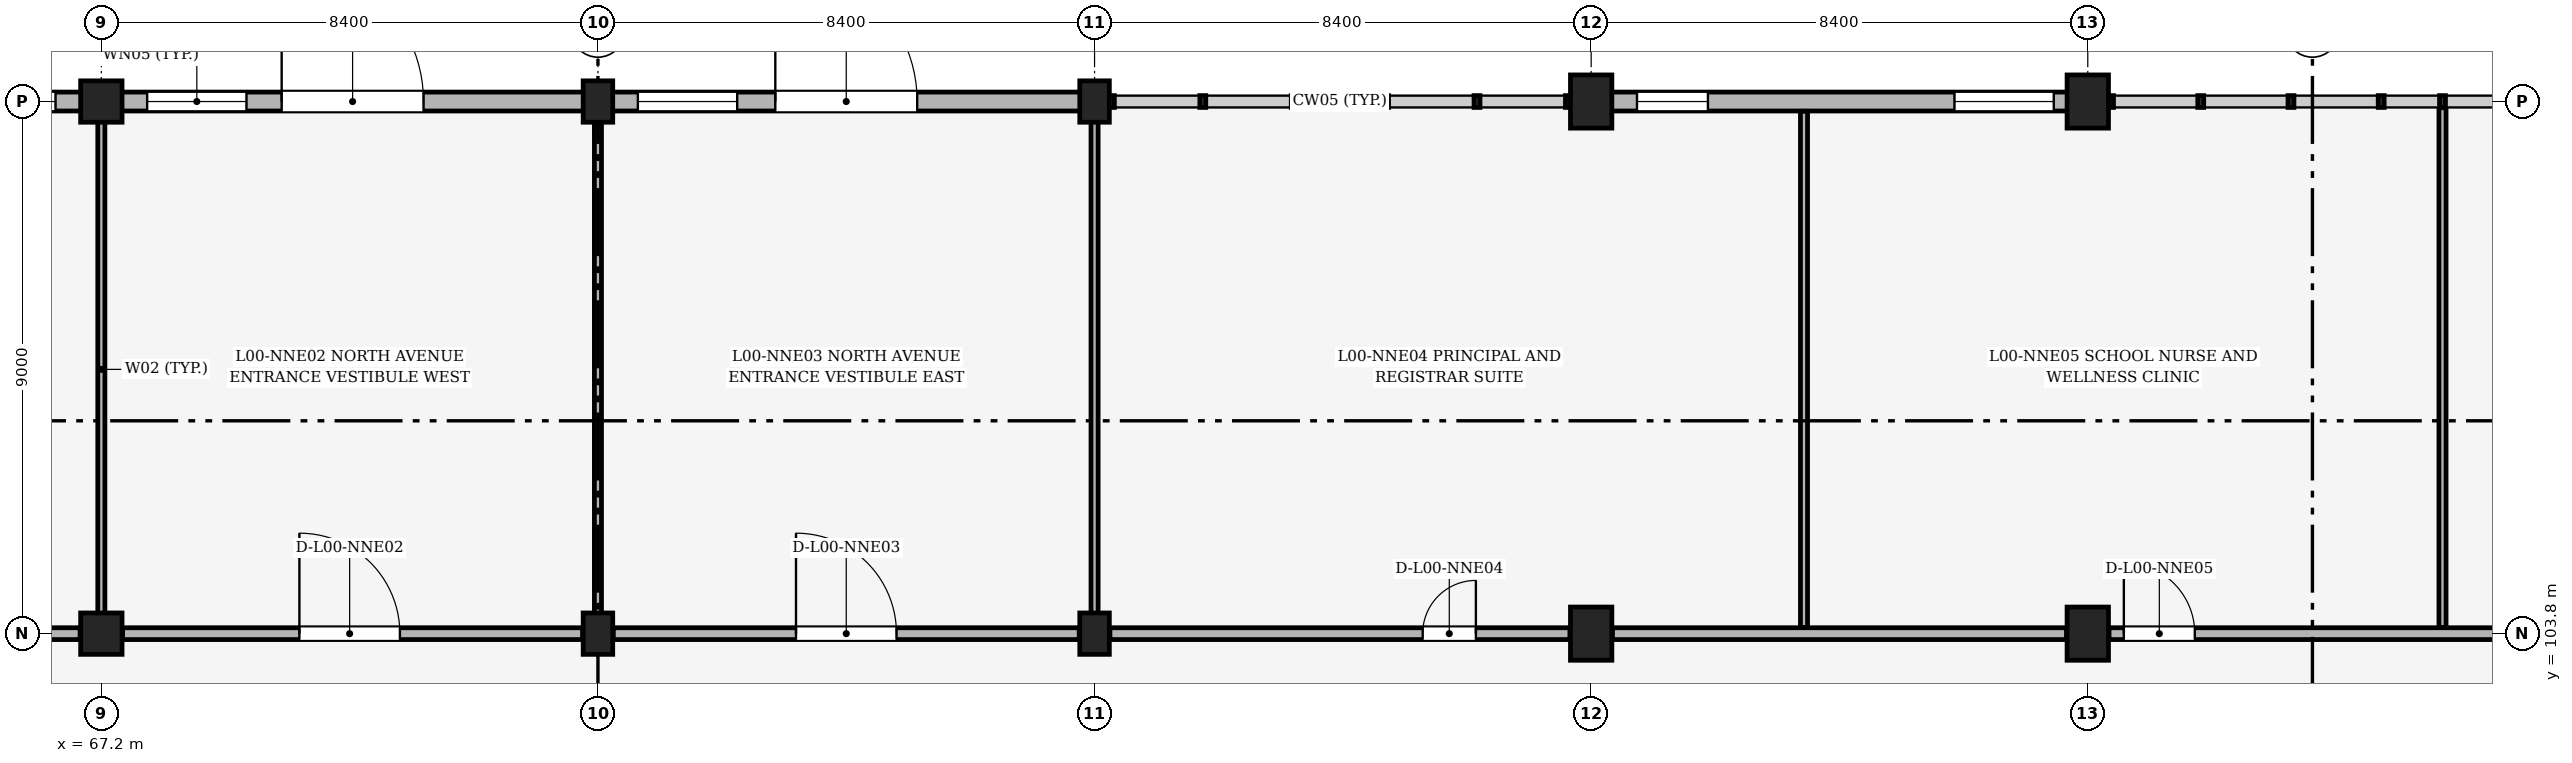
"""IFC4 building model, lengths in metres.
Left out: names, types, materials, properties, quantities, classifications, styles, units other than length and angle.
Written with IfcOpenShell. Run it as: python <this file> out.ifc"""

import sys

from ifc_helpers import new_model, si_unit, direction, frame, frame_2d, origin, origin_2d, place, context, subcontext, project, spatial, rectangle, extrude, element, fill, save


model = new_model("IFC4")
c1 = context("Model", 3, precision=1e-05, world=origin(), true_north=direction((0.0, 1.0)))
c2 = subcontext(c1, "Body", "Model", "MODEL_VIEW")
j1 = project(units=[si_unit("LENGTHUNIT", "METRE"), si_unit("PLANEANGLEUNIT", "RADIAN")], contexts=[c1])
p1 = place(None, origin())
s1 = spatial("IfcSite", under=j1, at=p1, CompositionType="ELEMENT")
p2 = place(p1, origin())
s2 = spatial("IfcBuilding", under=s1, at=p2, CompositionType="ELEMENT")
p3 = place(p2, origin())
s3 = spatial("IfcBuildingStorey", under=s2, at=p3, CompositionType="ELEMENT", Elevation=0.0)
for number, where, z_axis, x_axis in (
    (1, (67.2, 103.8, 0.0), (0.0, 0.0, 1.0), (1.0, 0.0, 0.0)),
    (2, (67.2, 112.8, 0.0), (0.0, 0.0, 1.0), (1.0, 0.0, 0.0)),
):
    element("IfcColumn", number, at=place(p3, frame(where, z_axis=z_axis, x_axis=x_axis)), inside=s3, PredefinedType="COLUMN", context=c2, shape_type="SweptSolid", body=[
        extrude(rectangle(XDim=0.7, YDim=0.7, at=origin_2d()), origin(), (0.0, 0.0, 1.0), 4.8),
    ])
for number, where, z_axis, x_axis in (
    (3, (75.6, 103.8, 0.0), (0.0, 0.0, 1.0), (1.0, 0.0, 0.0)),
    (4, (75.6, 112.8, 0.0), (0.0, 0.0, 1.0), (1.0, 0.0, 0.0)),
    (5, (84.0, 103.8, 0.0), (0.0, 0.0, 1.0), (1.0, 0.0, 0.0)),
    (6, (84.0, 112.8, 0.0), (0.0, 0.0, 1.0), (1.0, 0.0, 0.0)),
):
    element("IfcColumn", number, at=place(p3, frame(where, z_axis=z_axis, x_axis=x_axis)), inside=s3, PredefinedType="COLUMN", context=c2, shape_type="SweptSolid", body=[
        extrude(rectangle(XDim=0.5, YDim=0.7, at=origin_2d()), origin(), (0.0, 0.0, 1.0), 4.8),
    ])
for number, where, z_axis, x_axis in (
    (7, (92.4, 103.8, 0.0), (0.0, 0.0, 1.0), (1.0, 0.0, 0.0)),
    (8, (92.4, 112.8, 0.0), (0.0, 0.0, 1.0), (1.0, 0.0, 0.0)),
    (9, (100.8, 103.8, 0.0), (0.0, 0.0, 1.0), (1.0, 0.0, 0.0)),
    (10, (100.8, 112.8, 0.0), (0.0, 0.0, 1.0), (1.0, 0.0, 0.0)),
):
    element("IfcColumn", number, at=place(p3, frame(where, z_axis=z_axis, x_axis=x_axis)), inside=s3, PredefinedType="COLUMN", context=c2, shape_type="SweptSolid", body=[
        extrude(rectangle(XDim=0.7, YDim=0.9, at=origin_2d()), origin(), (0.0, 0.0, 1.0), 4.8),
    ])
p4 = place(p3, frame((59.125, 112.8, 0.0), z_axis=(0.0, 0.0, 1.0), x_axis=(1.0, 0.0, 0.0)))
e11 = element("IfcWall", 11, at=p4, inside=s3, PredefinedType="SOLIDWALL", context=c2, shape_type="SweptSolid", body=[
    extrude(rectangle(XDim=7.75, YDim=0.32, at=frame_2d((3.875, 0.0))), origin(), (0.0, 0.0, 1.0), 3.82),
])
p5 = place(p4, frame((0.45, 0.0, 0.9)))
e12 = element("IfcOpeningElement", 12, at=p5, cuts=e11, PredefinedType="OPENING", context=c2, shape_type="SweptSolid", body=[
    extrude(rectangle(XDim=1.2, YDim=1.5, at=frame_2d((0.6, 0.75))), frame((0.0, 0.17, 0.0), z_axis=(0.0, -1.0, 0.0), x_axis=(1.0, 0.0, 0.0)), (0.0, 0.0, 1.0), 0.34),
])
p6 = place(p4, frame((6.1, 0.0, 0.9)))
e13 = element("IfcOpeningElement", 13, at=p6, cuts=e11, PredefinedType="OPENING", context=c2, shape_type="SweptSolid", body=[
    extrude(rectangle(XDim=1.2, YDim=1.8, at=frame_2d((0.6, 0.9))), frame((0.0, 0.17, 0.0), z_axis=(0.0, -1.0, 0.0), x_axis=(1.0, 0.0, 0.0)), (0.0, 0.0, 1.0), 0.34),
])
p7 = place(p3, frame((67.525, 112.8, 0.0), z_axis=(0.0, 0.0, 1.0), x_axis=(1.0, 0.0, 0.0)))
e14 = element("IfcWall", 14, at=p7, inside=s3, PredefinedType="SOLIDWALL", context=c2, shape_type="SweptSolid", body=[
    extrude(rectangle(XDim=7.85, YDim=0.32, at=frame_2d((3.925, 0.0))), origin(), (0.0, 0.0, 1.0), 3.87),
])
p8 = place(p7, frame((2.725, 0.0, 0.0)))
e15 = element("IfcOpeningElement", 15, at=p8, cuts=e14, PredefinedType="OPENING", context=c2, shape_type="SweptSolid", body=[
    extrude(rectangle(XDim=2.4, YDim=2.6, at=frame_2d((1.2, 1.3))), frame((0.0, 0.17, 0.0), z_axis=(0.0, -1.0, 0.0), x_axis=(1.0, 0.0, 0.0)), (0.0, 0.0, 1.0), 0.34),
])
p9 = place(p7, frame((0.45, 0.0, 0.95)))
e16 = element("IfcOpeningElement", 16, at=p9, cuts=e14, PredefinedType="OPENING", context=c2, shape_type="SweptSolid", body=[
    extrude(rectangle(XDim=1.68, YDim=1.8, at=frame_2d((0.84, 0.9))), frame((0.0, 0.17, 0.0), z_axis=(0.0, -1.0, 0.0), x_axis=(1.0, 0.0, 0.0)), (0.0, 0.0, 1.0), 0.34),
])
p10 = place(p3, frame((75.825, 112.8, 0.0), z_axis=(0.0, 0.0, 1.0), x_axis=(1.0, 0.0, 0.0)))
e17 = element("IfcWall", 17, at=p10, inside=s3, PredefinedType="SOLIDWALL", context=c2, shape_type="SweptSolid", body=[
    extrude(rectangle(XDim=7.95, YDim=0.32, at=frame_2d((3.975, 0.0))), origin(), (0.0, 0.0, 1.0), 3.82),
])
p11 = place(p10, frame((2.775, 0.0, 0.0)))
e18 = element("IfcOpeningElement", 18, at=p11, cuts=e17, PredefinedType="OPENING", context=c2, shape_type="SweptSolid", body=[
    extrude(rectangle(XDim=2.4, YDim=2.6, at=frame_2d((1.2, 1.3))), frame((0.0, 0.17, 0.0), z_axis=(0.0, -1.0, 0.0), x_axis=(1.0, 0.0, 0.0)), (0.0, 0.0, 1.0), 0.34),
])
p12 = place(p10, frame((0.45, 0.0, 0.95)))
e19 = element("IfcOpeningElement", 19, at=p12, cuts=e17, PredefinedType="OPENING", context=c2, shape_type="SweptSolid", body=[
    extrude(rectangle(XDim=1.68, YDim=1.8, at=frame_2d((0.84, 0.9))), frame((0.0, 0.17, 0.0), z_axis=(0.0, -1.0, 0.0), x_axis=(1.0, 0.0, 0.0)), (0.0, 0.0, 1.0), 0.34),
])
p13 = place(p3, frame((92.725, 112.8, 0.0), z_axis=(0.0, 0.0, 1.0), x_axis=(1.0, 0.0, 0.0)))
e20 = element("IfcWall", 20, at=p13, inside=s3, PredefinedType="SOLIDWALL", context=c2, shape_type="SweptSolid", body=[
    extrude(rectangle(XDim=7.75, YDim=0.32, at=frame_2d((3.875, 0.0))), origin(), (0.0, 0.0, 1.0), 3.72),
])
p14 = place(p13, frame((0.45, 0.0, 0.9)))
e21 = element("IfcOpeningElement", 21, at=p14, cuts=e20, PredefinedType="OPENING", context=c2, shape_type="SweptSolid", body=[
    extrude(rectangle(XDim=1.2, YDim=1.8, at=frame_2d((0.6, 0.9))), frame((0.0, 0.17, 0.0), z_axis=(0.0, -1.0, 0.0), x_axis=(1.0, 0.0, 0.0)), (0.0, 0.0, 1.0), 0.34),
])
p15 = place(p13, frame((5.82, 0.0, 0.9)))
e22 = element("IfcOpeningElement", 22, at=p15, cuts=e20, PredefinedType="OPENING", context=c2, shape_type="SweptSolid", body=[
    extrude(rectangle(XDim=1.68, YDim=2.4, at=frame_2d((0.84, 1.2))), frame((0.0, 0.17, 0.0), z_axis=(0.0, -1.0, 0.0), x_axis=(1.0, 0.0, 0.0)), (0.0, 0.0, 1.0), 0.34),
])
p16 = place(p3, frame((67.2, 103.905, 0.0), z_axis=(0.0, 0.0, 1.0), x_axis=(0.0, 1.0, 0.0)))
e23 = element("IfcWall", 23, at=p16, inside=s3, PredefinedType="PARTITIONING", context=c2, shape_type="SweptSolid", body=[
    extrude(rectangle(XDim=8.73, YDim=0.12, at=frame_2d((4.365, 0.0))), origin(), (0.0, 0.0, 1.0), 3.52),
])
p17 = place(p3, frame((75.6, 103.905, 0.0), z_axis=(0.0, 0.0, 1.0), x_axis=(0.0, 1.0, 0.0)))
e24 = element("IfcWall", 24, at=p17, inside=s3, PredefinedType="PARTITIONING", context=c2, shape_type="SweptSolid", body=[
    extrude(rectangle(XDim=8.73, YDim=0.12, at=frame_2d((4.365, 0.0))), origin(), (0.0, 0.0, 1.0), 3.87),
])
p18 = place(p3, frame((84.0, 103.905, 0.0), z_axis=(0.0, 0.0, 1.0), x_axis=(0.0, 1.0, 0.0)))
e25 = element("IfcWall", 25, at=p18, inside=s3, PredefinedType="PARTITIONING", context=c2, shape_type="SweptSolid", body=[
    extrude(rectangle(XDim=8.73, YDim=0.12, at=frame_2d((4.365, 0.0))), origin(), (0.0, 0.0, 1.0), 3.72),
])
p19 = place(p3, frame((96.0, 103.905, 0.0), z_axis=(0.0, 0.0, 1.0), x_axis=(0.0, 1.0, 0.0)))
e26 = element("IfcWall", 26, at=p19, inside=s3, PredefinedType="PARTITIONING", context=c2, shape_type="SweptSolid", body=[
    extrude(rectangle(XDim=8.73, YDim=0.12, at=frame_2d((4.365, 0.0))), origin(), (0.0, 0.0, 1.0), 4.5),
])
p20 = place(p3, frame((106.8, 103.905, 0.0), z_axis=(0.0, 0.0, 1.0), x_axis=(0.0, 1.0, 0.0)))
e27 = element("IfcWall", 27, at=p20, inside=s3, PredefinedType="PARTITIONING", context=c2, shape_type="SweptSolid", body=[
    extrude(rectangle(XDim=8.79, YDim=0.12, at=frame_2d((4.395, 0.0))), origin(), (0.0, 0.0, 1.0), 4.5),
])
p21 = place(p3, frame((59.16, 103.8, 0.0), z_axis=(0.0, 0.0, 1.0), x_axis=(1.0, 0.0, 0.0)))
e28 = element("IfcWall", 28, at=p21, inside=s3, PredefinedType="PARTITIONING", context=c2, shape_type="SweptSolid", body=[
    extrude(rectangle(XDim=7.68, YDim=0.2, at=frame_2d((3.84, 0.0))), origin(), (0.0, 0.0, 1.0), 3.62),
])
p22 = place(p21, frame((1.315, 0.0, 0.0)))
e29 = element("IfcOpeningElement", 29, at=p22, cuts=e28, PredefinedType="OPENING", context=c2, shape_type="SweptSolid", body=[
    extrude(rectangle(XDim=0.9, YDim=2.1, at=frame_2d((0.45, 1.05))), frame((0.0, 0.11, 0.0), z_axis=(0.0, -1.0, 0.0), x_axis=(1.0, 0.0, 0.0)), (0.0, 0.0, 1.0), 0.22),
])
p23 = place(p3, frame((67.56, 103.8, 0.0), z_axis=(0.0, 0.0, 1.0), x_axis=(1.0, 0.0, 0.0)))
e30 = element("IfcWall", 30, at=p23, inside=s3, PredefinedType="PARTITIONING", context=c2, shape_type="SweptSolid", body=[
    extrude(rectangle(XDim=7.78, YDim=0.2, at=frame_2d((3.89, 0.0))), origin(), (0.0, 0.0, 1.0), 3.57),
])
p24 = place(p23, frame((2.99, 0.0, 0.0)))
e31 = element("IfcOpeningElement", 31, at=p24, cuts=e30, PredefinedType="OPENING", context=c2, shape_type="SweptSolid", body=[
    extrude(rectangle(XDim=1.7, YDim=2.25, at=frame_2d((0.85, 1.125))), frame((0.0, 0.11, 0.0), z_axis=(0.0, -1.0, 0.0), x_axis=(1.0, 0.0, 0.0)), (0.0, 0.0, 1.0), 0.22),
])
p25 = place(p3, frame((75.86, 103.8, 0.0), z_axis=(0.0, 0.0, 1.0), x_axis=(1.0, 0.0, 0.0)))
e32 = element("IfcWall", 32, at=p25, inside=s3, PredefinedType="PARTITIONING", context=c2, shape_type="SweptSolid", body=[
    extrude(rectangle(XDim=7.88, YDim=0.2, at=frame_2d((3.94, 0.0))), origin(), (0.0, 0.0, 1.0), 3.57),
])
p26 = place(p25, frame((3.09, 0.0, 0.0)))
e33 = element("IfcOpeningElement", 33, at=p26, cuts=e32, PredefinedType="OPENING", context=c2, shape_type="SweptSolid", body=[
    extrude(rectangle(XDim=1.7, YDim=2.25, at=frame_2d((0.85, 1.125))), frame((0.0, 0.11, 0.0), z_axis=(0.0, -1.0, 0.0), x_axis=(1.0, 0.0, 0.0)), (0.0, 0.0, 1.0), 0.22),
])
p27 = place(p3, frame((84.26, 103.8, 0.0), z_axis=(0.0, 0.0, 1.0), x_axis=(1.0, 0.0, 0.0)))
e34 = element("IfcWall", 34, at=p27, inside=s3, PredefinedType="PARTITIONING", context=c2, shape_type="SweptSolid", body=[
    extrude(rectangle(XDim=7.78, YDim=0.2, at=frame_2d((3.89, 0.0))), origin(), (0.0, 0.0, 1.0), 3.52),
])
p28 = place(p27, frame((5.29, 0.0, 0.0)))
e35 = element("IfcOpeningElement", 35, at=p28, cuts=e34, PredefinedType="OPENING", context=c2, shape_type="SweptSolid", body=[
    extrude(rectangle(XDim=0.9, YDim=2.1, at=frame_2d((0.45, 1.05))), frame((0.0, 0.11, 0.0), z_axis=(0.0, -1.0, 0.0), x_axis=(1.0, 0.0, 0.0)), (0.0, 0.0, 1.0), 0.22),
])
p29 = place(p3, frame((92.76, 103.8, 0.0), z_axis=(0.0, 0.0, 1.0), x_axis=(1.0, 0.0, 0.0)))
e36 = element("IfcWall", 36, at=p29, inside=s3, PredefinedType="PARTITIONING", context=c2, shape_type="SweptSolid", body=[
    extrude(rectangle(XDim=7.68, YDim=0.2, at=frame_2d((3.84, 0.0))), origin(), (0.0, 0.0, 1.0), 3.47),
])
p30 = place(p3, frame((101.16, 103.8, 0.0), z_axis=(0.0, 0.0, 1.0), x_axis=(1.0, 0.0, 0.0)))
e37 = element("IfcWall", 37, at=p30, inside=s3, PredefinedType="PARTITIONING", context=c2, shape_type="SweptSolid", body=[
    extrude(rectangle(XDim=7.68, YDim=0.2, at=frame_2d((3.84, 0.0))), origin(), (0.0, 0.0, 1.0), 3.37),
])
p31 = place(p30, frame((0.25, 0.0, 0.0)))
e38 = element("IfcOpeningElement", 38, at=p31, cuts=e37, PredefinedType="OPENING", context=c2, shape_type="SweptSolid", body=[
    extrude(rectangle(XDim=1.2, YDim=2.2, at=frame_2d((0.6, 1.1))), frame((0.0, 0.11, 0.0), z_axis=(0.0, -1.0, 0.0), x_axis=(1.0, 0.0, 0.0)), (0.0, 0.0, 1.0), 0.22),
])
p32 = place(p6, origin())
e39 = element("IfcWindow", 39, at=p32, inside=s3, PartitioningType="SINGLE_PANEL", PredefinedType="WINDOW", context=c2, shape_type="SweptSolid", body=[
    extrude(rectangle(XDim=1.2, YDim=1.8, at=frame_2d((0.6, 0.9))), frame((0.0, 0.03, 0.0), z_axis=(0.0, -1.0, 0.0), x_axis=(1.0, 0.0, 0.0)), (0.0, 0.0, 1.0), 0.06),
])
fill(e13, e39)
p33 = place(p8, origin())
e40 = element("IfcDoor", 40, at=p33, inside=s3, OperationType="DOUBLE_DOOR_SINGLE_SWING", PredefinedType="DOOR", context=c2, shape_type="SweptSolid", body=[
    extrude(rectangle(XDim=2.4, YDim=2.6, at=frame_2d((1.2, 1.3))), frame((0.0, 0.025, 0.0), z_axis=(0.0, -1.0, 0.0), x_axis=(1.0, 0.0, 0.0)), (0.0, 0.0, 1.0), 0.05),
])
fill(e15, e40)
p34 = place(p9, origin())
e41 = element("IfcWindow", 41, at=p34, inside=s3, PartitioningType="SINGLE_PANEL", PredefinedType="WINDOW", context=c2, shape_type="SweptSolid", body=[
    extrude(rectangle(XDim=1.68, YDim=1.8, at=frame_2d((0.84, 0.9))), frame((0.0, 0.03, 0.0), z_axis=(0.0, -1.0, 0.0), x_axis=(1.0, 0.0, 0.0)), (0.0, 0.0, 1.0), 0.06),
])
fill(e16, e41)
p35 = place(p11, origin())
e42 = element("IfcDoor", 42, at=p35, inside=s3, OperationType="DOUBLE_DOOR_SINGLE_SWING", PredefinedType="DOOR", context=c2, shape_type="SweptSolid", body=[
    extrude(rectangle(XDim=2.4, YDim=2.6, at=frame_2d((1.2, 1.3))), frame((0.0, 0.025, 0.0), z_axis=(0.0, -1.0, 0.0), x_axis=(1.0, 0.0, 0.0)), (0.0, 0.0, 1.0), 0.05),
])
fill(e18, e42)
p36 = place(p12, origin())
e43 = element("IfcWindow", 43, at=p36, inside=s3, PartitioningType="SINGLE_PANEL", PredefinedType="WINDOW", context=c2, shape_type="SweptSolid", body=[
    extrude(rectangle(XDim=1.68, YDim=1.8, at=frame_2d((0.84, 0.9))), frame((0.0, 0.03, 0.0), z_axis=(0.0, -1.0, 0.0), x_axis=(1.0, 0.0, 0.0)), (0.0, 0.0, 1.0), 0.06),
])
fill(e19, e43)
p37 = place(p14, origin())
e44 = element("IfcWindow", 44, at=p37, inside=s3, PartitioningType="SINGLE_PANEL", PredefinedType="WINDOW", context=c2, shape_type="SweptSolid", body=[
    extrude(rectangle(XDim=1.2, YDim=1.8, at=frame_2d((0.6, 0.9))), frame((0.0, 0.03, 0.0), z_axis=(0.0, -1.0, 0.0), x_axis=(1.0, 0.0, 0.0)), (0.0, 0.0, 1.0), 0.06),
])
fill(e21, e44)
p38 = place(p15, origin())
e45 = element("IfcWindow", 45, at=p38, inside=s3, PartitioningType="SINGLE_PANEL", PredefinedType="WINDOW", context=c2, shape_type="SweptSolid", body=[
    extrude(rectangle(XDim=1.68, YDim=2.4, at=frame_2d((0.84, 1.2))), frame((0.0, 0.03, 0.0), z_axis=(0.0, -1.0, 0.0), x_axis=(1.0, 0.0, 0.0)), (0.0, 0.0, 1.0), 0.06),
])
fill(e22, e45)
p39 = place(p24, origin())
e46 = element("IfcDoor", 46, at=p39, inside=s3, OperationType="DOUBLE_DOOR_SINGLE_SWING", PredefinedType="DOOR", context=c2, shape_type="SweptSolid", body=[
    extrude(rectangle(XDim=1.7, YDim=2.25, at=frame_2d((0.85, 1.125))), frame((0.0, 0.025, 0.0), z_axis=(0.0, -1.0, 0.0), x_axis=(1.0, 0.0, 0.0)), (0.0, 0.0, 1.0), 0.05),
])
fill(e31, e46)
p40 = place(p26, origin())
e47 = element("IfcDoor", 47, at=p40, inside=s3, OperationType="DOUBLE_DOOR_SINGLE_SWING", PredefinedType="DOOR", context=c2, shape_type="SweptSolid", body=[
    extrude(rectangle(XDim=1.7, YDim=2.25, at=frame_2d((0.85, 1.125))), frame((0.0, 0.025, 0.0), z_axis=(0.0, -1.0, 0.0), x_axis=(1.0, 0.0, 0.0)), (0.0, 0.0, 1.0), 0.05),
])
fill(e33, e47)
p41 = place(p28, origin())
e48 = element("IfcDoor", 48, at=p41, inside=s3, OperationType="SINGLE_SWING_RIGHT", PredefinedType="DOOR", context=c2, shape_type="SweptSolid", body=[
    extrude(rectangle(XDim=0.9, YDim=2.1, at=frame_2d((0.45, 1.05))), frame((0.0, 0.025, 0.0), z_axis=(0.0, -1.0, 0.0), x_axis=(1.0, 0.0, 0.0)), (0.0, 0.0, 1.0), 0.05),
])
fill(e35, e48)
p42 = place(p31, origin())
e49 = element("IfcDoor", 49, at=p42, inside=s3, OperationType="SINGLE_SWING_LEFT", PredefinedType="DOOR", context=c2, shape_type="SweptSolid", body=[
    extrude(rectangle(XDim=1.2, YDim=2.2, at=frame_2d((0.6, 1.1))), frame((0.0, 0.025, 0.0), z_axis=(0.0, -1.0, 0.0), x_axis=(1.0, 0.0, 0.0)), (0.0, 0.0, 1.0), 0.05),
])
fill(e38, e49)
save(model, sys.argv[1])
